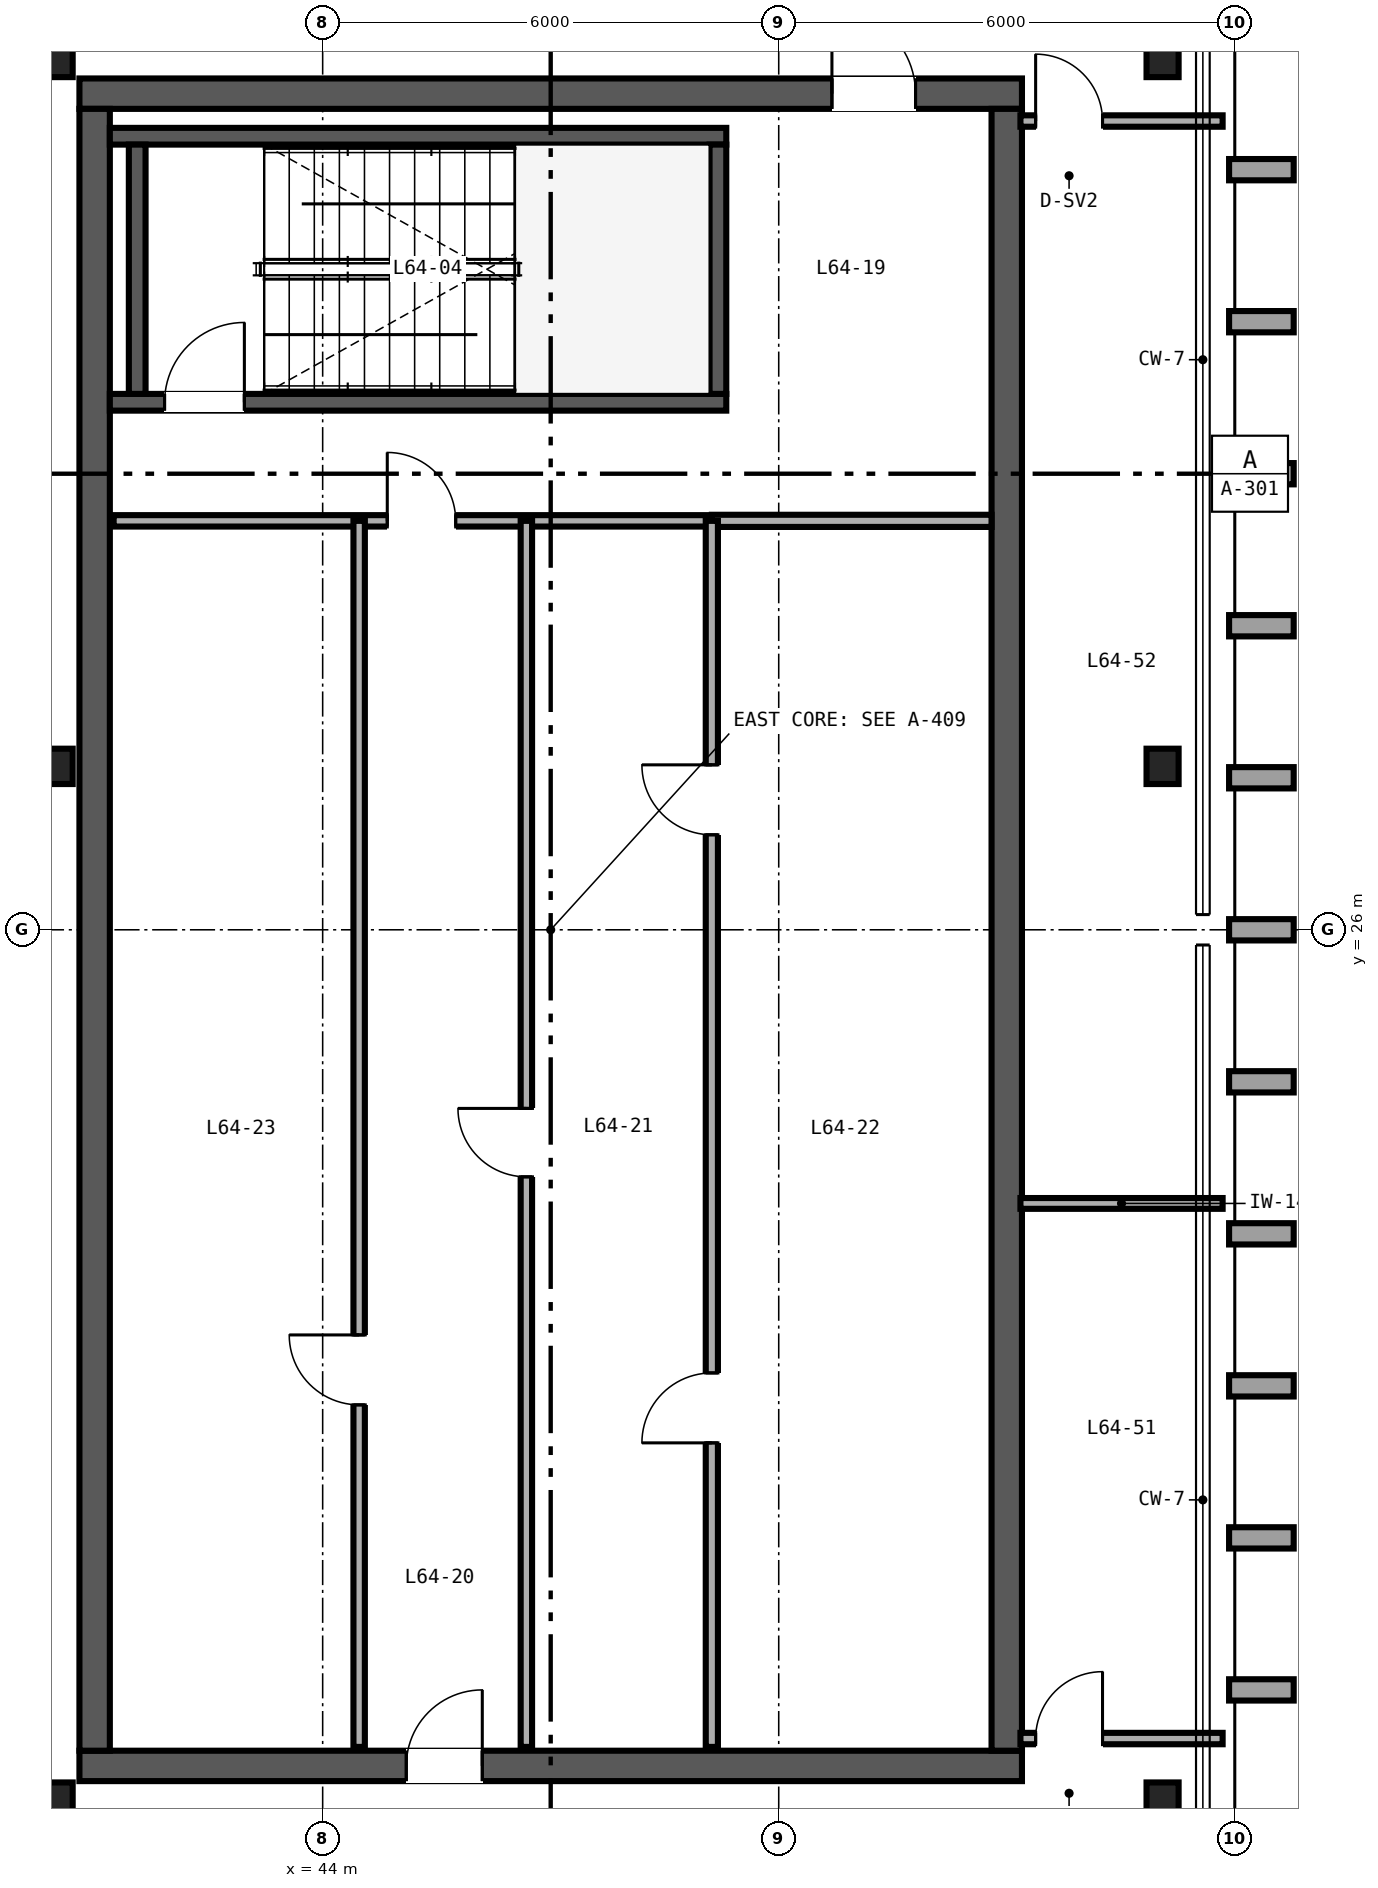
"""IFC4 building model, lengths in metres.
Left out: names, types, materials, properties, quantities, classifications, styles, units other than length and angle.
Written with IfcOpenShell. Run it as: python <this file> out.ifc"""

import sys

from ifc_helpers import new_model, si_unit, direction, frame, frame_2d, origin, origin_2d, place, context, subcontext, project, spatial, rectangle, i_section, extrude, source, transform, mapped, element, fill, save


model = new_model("IFC4")
c1 = context("Model", 3, precision=1e-05, world=origin(), true_north=direction((0.0, 1.0)))
c2 = subcontext(c1, "Body", "Model", "MODEL_VIEW")
j1 = project(units=[si_unit("LENGTHUNIT", "METRE"), si_unit("PLANEANGLEUNIT", "RADIAN")], contexts=[c1])
p1 = place(None, origin())
s1 = spatial("IfcSite", under=j1, at=p1, CompositionType="ELEMENT")
p2 = place(p1, origin())
s2 = spatial("IfcBuilding", under=s1, at=p2, CompositionType="ELEMENT")
p3 = place(p2, frame((0.0, 0.0, 254.4)))
s3 = spatial("IfcBuildingStorey", under=s2, at=p3, CompositionType="ELEMENT", Elevation=254.4)
p4 = place(p3, frame((40.8, 15.0, 0.0), z_axis=(0.0, 0.0, 1.0), x_axis=(1.0, 0.0, 0.0)))
e1 = element("IfcWall", 1, at=p4, inside=s3, PredefinedType="SHEAR", context=c2, shape_type="SweptSolid", body=[
    extrude(rectangle(XDim=12.4, YDim=0.4, at=frame_2d((6.2, 0.0))), origin(), (0.0, 0.0, 1.0), 3.38),
])
p5 = place(p4, frame((4.3, 0.0, 0.0)))
e2 = element("IfcOpeningElement", 2, at=p5, cuts=e1, PredefinedType="OPENING", context=c2, shape_type="SweptSolid", body=[
    extrude(rectangle(XDim=1.0, YDim=2.15, at=frame_2d((0.5, 1.075))), frame((0.0, 0.21, 0.0), z_axis=(0.0, -1.0, 0.0), x_axis=(1.0, 0.0, 0.0)), (0.0, 0.0, 1.0), 0.42),
])
p6 = place(p3, frame((40.8, 37.0, 0.0), z_axis=(0.0, 0.0, 1.0), x_axis=(1.0, 0.0, 0.0)))
e3 = element("IfcWall", 3, at=p6, inside=s3, PredefinedType="SHEAR", context=c2, shape_type="SweptSolid", body=[
    extrude(rectangle(XDim=12.4, YDim=0.4, at=frame_2d((6.2, 0.0))), origin(), (0.0, 0.0, 1.0), 3.38),
])
p7 = place(p6, frame((9.9, 0.0, 0.0)))
e4 = element("IfcOpeningElement", 4, at=p7, cuts=e3, PredefinedType="OPENING", context=c2, shape_type="SweptSolid", body=[
    extrude(rectangle(XDim=1.1, YDim=2.15, at=frame_2d((0.55, 1.075))), frame((0.0, 0.21, 0.0), z_axis=(0.0, -1.0, 0.0), x_axis=(1.0, 0.0, 0.0)), (0.0, 0.0, 1.0), 0.42),
])
for number, where, z_axis, x_axis in (
    (5, (41.0, 15.2, 0.0), (0.0, 0.0, 1.0), (0.0, 1.0, 0.0)),
    (6, (53.0, 15.2, 0.0), (0.0, 0.0, 1.0), (0.0, 1.0, 0.0)),
):
    element("IfcWall", number, at=place(p3, frame(where, z_axis=z_axis, x_axis=x_axis)), inside=s3, PredefinedType="SHEAR", context=c2, shape_type="SweptSolid", body=[
        extrude(rectangle(XDim=21.6, YDim=0.4, at=frame_2d((10.8, 0.0))), origin(), (0.0, 0.0, 1.0), 3.38),
    ])
p8 = place(p3, frame((41.2, 32.94, 0.0), z_axis=(0.0, 0.0, 1.0), x_axis=(1.0, 0.0, 0.0)))
e7 = element("IfcWall", 7, at=p8, inside=s3, PredefinedType="SHEAR", context=c2, shape_type="SweptSolid", body=[
    extrude(rectangle(XDim=8.11, YDim=0.22, at=frame_2d((4.055, 0.0))), origin(), (0.0, 0.0, 1.0), 3.4),
])
p9 = place(p8, frame((0.72, 0.0, 0.0)))
e8 = element("IfcOpeningElement", 8, at=p9, cuts=e7, PredefinedType="OPENING", context=c2, shape_type="SweptSolid", body=[
    extrude(rectangle(XDim=1.05, YDim=2.15, at=frame_2d((0.525, 1.075))), frame((0.0, 0.12, 0.0), z_axis=(0.0, -1.0, 0.0), x_axis=(1.0, 0.0, 0.0)), (0.0, 0.0, 1.0), 0.24),
])
p10 = place(p3, frame((41.2, 36.44, 0.0), z_axis=(0.0, 0.0, 1.0), x_axis=(1.0, 0.0, 0.0)))
e9 = element("IfcWall", 9, at=p10, inside=s3, PredefinedType="SHEAR", context=c2, shape_type="SweptSolid", body=[
    extrude(rectangle(XDim=8.11, YDim=0.22, at=frame_2d((4.055, 0.0))), origin(), (0.0, 0.0, 1.0), 3.4),
])
for number, where, z_axis, x_axis in (
    (10, (41.56, 33.05, 0.0), (0.0, 0.0, 1.0), (0.0, 1.0, 0.0)),
    (11, (49.2, 33.05, 0.0), (0.0, 0.0, 1.0), (0.0, 1.0, 0.0)),
):
    element("IfcWall", number, at=place(p3, frame(where, z_axis=z_axis, x_axis=x_axis)), inside=s3, PredefinedType="SHEAR", context=c2, shape_type="SweptSolid", body=[
        extrude(rectangle(XDim=3.28, YDim=0.22, at=frame_2d((1.64, 0.0))), origin(), (0.0, 0.0, 1.0), 3.4),
    ])
m1 = source(origin(), c2, "Body", "SweptSolid", [
    extrude(i_section(OverallWidth=0.422, OverallDepth=0.465, WebThickness=0.045, FlangeThickness=0.073, FilletRadius=0.025, at=origin_2d()), origin(), (0.0, 0.0, 1.0), 3.38),
])
for number, where, z_axis, x_axis in (
    (12, (40.5, 14.55, 0.0), (0.0, 0.0, 1.0), (1.0, 0.0, 0.0)),
    (13, (55.05, 14.55, 0.0), (0.0, 0.0, 1.0), (1.0, 0.0, 0.0)),
    (14, (40.5, 28.15, 0.0), (0.0, 0.0, 1.0), (1.0, 0.0, 0.0)),
    (15, (55.05, 28.15, 0.0), (0.0, 0.0, 1.0), (1.0, 0.0, 0.0)),
    (16, (40.5, 37.45, 0.0), (0.0, 0.0, 1.0), (1.0, 0.0, 0.0)),
    (17, (55.05, 37.45, 0.0), (0.0, 0.0, 1.0), (1.0, 0.0, 0.0)),
):
    element("IfcColumn", number, at=place(p3, frame(where, z_axis=z_axis, x_axis=x_axis)), inside=s3, PredefinedType="COLUMN", context=c2, shape_type="MappedRepresentation", body=[
        mapped(m1, transform((0.0, 0.0, 0.0), scale=1.0)),
    ])
p11 = place(p3, frame((41.25, 31.38, 0.0), z_axis=(0.0, 0.0, 1.0), x_axis=(1.0, 0.0, 0.0)))
e18 = element("IfcWall", 18, at=p11, inside=s3, PredefinedType="PARTITIONING", context=c2, shape_type="SweptSolid", body=[
    extrude(rectangle(XDim=7.87, YDim=0.15, at=frame_2d((3.935, 0.0))), origin(), (0.0, 0.0, 1.0), 2.48),
])
p12 = place(p11, frame((3.6, 0.0, 0.0)))
e19 = element("IfcOpeningElement", 19, at=p12, cuts=e18, PredefinedType="OPENING", context=c2, shape_type="SweptSolid", body=[
    extrude(rectangle(XDim=0.9, YDim=2.15, at=frame_2d((0.45, 1.075))), frame((0.0, 0.085, 0.0), z_axis=(0.0, -1.0, 0.0), x_axis=(1.0, 0.0, 0.0)), (0.0, 0.0, 1.0), 0.17),
])
p13 = place(p3, frame((46.68, 15.25, 0.0), z_axis=(0.0, 0.0, 1.0), x_axis=(0.0, 1.0, 0.0)))
e20 = element("IfcWall", 20, at=p13, inside=s3, PredefinedType="PARTITIONING", context=c2, shape_type="SweptSolid", body=[
    extrude(rectangle(XDim=16.13, YDim=0.15, at=frame_2d((8.065, 0.0))), origin(), (0.0, 0.0, 1.0), 2.453),
])
p14 = place(p13, frame((7.5, 0.0, 0.0)))
e21 = element("IfcOpeningElement", 21, at=p14, cuts=e20, PredefinedType="OPENING", context=c2, shape_type="SweptSolid", body=[
    extrude(rectangle(XDim=0.9, YDim=2.15, at=frame_2d((0.45, 1.075))), frame((0.0, 0.085, 0.0), z_axis=(0.0, -1.0, 0.0), x_axis=(1.0, 0.0, 0.0)), (0.0, 0.0, 1.0), 0.17),
])
p15 = place(p3, frame((49.12, 31.38, 0.0), z_axis=(0.0, 0.0, 1.0), x_axis=(1.0, 0.0, 0.0)))
e22 = element("IfcWall", 22, at=p15, inside=s3, PredefinedType="PARTITIONING", context=c2, shape_type="SweptSolid", body=[
    extrude(rectangle(XDim=3.68, YDim=0.16, at=frame_2d((1.84, 0.0))), origin(), (0.0, 0.0, 1.0), 2.48),
])
p16 = place(p3, frame((49.12, 15.25, 0.0), z_axis=(0.0, 0.0, 1.0), x_axis=(0.0, 1.0, 0.0)))
e23 = element("IfcWall", 23, at=p16, inside=s3, PredefinedType="PARTITIONING", context=c2, shape_type="SweptSolid", body=[
    extrude(rectangle(XDim=16.13, YDim=0.16, at=frame_2d((8.065, 0.0))), origin(), (0.0, 0.0, 1.0), 2.453),
])
p17 = place(p16, frame((4.0, 0.0, 0.0)))
e24 = element("IfcOpeningElement", 24, at=p17, cuts=e23, PredefinedType="OPENING", context=c2, shape_type="SweptSolid", body=[
    extrude(rectangle(XDim=0.92, YDim=2.15, at=frame_2d((0.46, 1.075))), frame((0.0, 0.09, 0.0), z_axis=(0.0, -1.0, 0.0), x_axis=(1.0, 0.0, 0.0)), (0.0, 0.0, 1.0), 0.18),
])
p18 = place(p16, frame((12.0, 0.0, 0.0)))
e25 = element("IfcOpeningElement", 25, at=p18, cuts=e23, PredefinedType="OPENING", context=c2, shape_type="SweptSolid", body=[
    extrude(rectangle(XDim=0.92, YDim=2.15, at=frame_2d((0.46, 1.075))), frame((0.0, 0.09, 0.0), z_axis=(0.0, -1.0, 0.0), x_axis=(1.0, 0.0, 0.0)), (0.0, 0.0, 1.0), 0.18),
])
p19 = place(p3, frame((44.48, 15.25, 0.0), z_axis=(0.0, 0.0, 1.0), x_axis=(0.0, 1.0, 0.0)))
e26 = element("IfcWall", 26, at=p19, inside=s3, PredefinedType="PARTITIONING", context=c2, shape_type="SweptSolid", body=[
    extrude(rectangle(XDim=16.13, YDim=0.15, at=frame_2d((8.065, 0.0))), origin(), (0.0, 0.0, 1.0), 2.453),
])
p20 = place(p19, frame((4.5, 0.0, 0.0)))
e27 = element("IfcOpeningElement", 27, at=p20, cuts=e26, PredefinedType="OPENING", context=c2, shape_type="SweptSolid", body=[
    extrude(rectangle(XDim=0.92, YDim=2.15, at=frame_2d((0.46, 1.075))), frame((0.0, 0.085, 0.0), z_axis=(0.0, -1.0, 0.0), x_axis=(1.0, 0.0, 0.0)), (0.0, 0.0, 1.0), 0.17),
])
p21 = place(p3, frame((53.18, 15.36, 0.0), z_axis=(0.0, 0.0, 1.0), x_axis=(1.0, 0.0, 0.0)))
e28 = element("IfcWall", 28, at=p21, inside=s3, PredefinedType="PARTITIONING", context=c2, shape_type="SweptSolid", body=[
    extrude(rectangle(XDim=2.66, YDim=0.15, at=frame_2d((1.33, 0.0))), origin(), (0.0, 0.0, 1.0), 2.601),
])
p22 = place(p21, frame((0.2, 0.0, 0.0)))
e29 = element("IfcOpeningElement", 29, at=p22, cuts=e28, PredefinedType="OPENING", context=c2, shape_type="SweptSolid", body=[
    extrude(rectangle(XDim=0.88, YDim=2.15, at=frame_2d((0.44, 1.075))), frame((0.0, 0.085, 0.0), z_axis=(0.0, -1.0, 0.0), x_axis=(1.0, 0.0, 0.0)), (0.0, 0.0, 1.0), 0.17),
])
p23 = place(p3, frame((53.18, 36.64, 0.0), z_axis=(0.0, 0.0, 1.0), x_axis=(1.0, 0.0, 0.0)))
e30 = element("IfcWall", 30, at=p23, inside=s3, PredefinedType="PARTITIONING", context=c2, shape_type="SweptSolid", body=[
    extrude(rectangle(XDim=2.66, YDim=0.15, at=frame_2d((1.33, 0.0))), origin(), (0.0, 0.0, 1.0), 2.763),
])
p24 = place(p23, frame((0.2, 0.0, 0.0)))
e31 = element("IfcOpeningElement", 31, at=p24, cuts=e30, PredefinedType="OPENING", context=c2, shape_type="SweptSolid", body=[
    extrude(rectangle(XDim=0.88, YDim=2.15, at=frame_2d((0.44, 1.075))), frame((0.0, 0.085, 0.0), z_axis=(0.0, -1.0, 0.0), x_axis=(1.0, 0.0, 0.0)), (0.0, 0.0, 1.0), 0.17),
])
p25 = place(p3, frame((53.18, 22.4, 0.0), z_axis=(0.0, 0.0, 1.0), x_axis=(1.0, 0.0, 0.0)))
e32 = element("IfcWall", 32, at=p25, inside=s3, PredefinedType="PARTITIONING", context=c2, shape_type="SweptSolid", body=[
    extrude(rectangle(XDim=2.66, YDim=0.142, at=frame_2d((1.33, 0.0))), origin(), (0.0, 0.0, 1.0), 2.601),
])
m2 = source(origin(), c2, "Body", "SweptSolid", [
    extrude(rectangle(XDim=1.05, YDim=2.15, at=frame_2d((0.525, 1.075))), frame((0.0, 0.025, 0.0), z_axis=(0.0, -1.0, 0.0), x_axis=(1.0, 0.0, 0.0)), (0.0, 0.0, 1.0), 0.05),
])
p26 = place(p9, origin())
e33 = element("IfcDoor", 33, at=p26, inside=s3, OperationType="SINGLE_SWING_RIGHT", PredefinedType="DOOR", context=c2, shape_type="MappedRepresentation", body=[
    mapped(m2, transform((0.0, 0.0, 0.0), scale=1.0)),
])
fill(e8, e33)
m3 = source(origin(), c2, "Body", "SweptSolid", [
    extrude(rectangle(XDim=0.9, YDim=2.15, at=frame_2d((0.45, 1.075))), frame((0.0, 0.025, 0.0), z_axis=(0.0, -1.0, 0.0), x_axis=(1.0, 0.0, 0.0)), (0.0, 0.0, 1.0), 0.05),
])
p27 = place(p14, origin())
e34 = element("IfcDoor", 34, at=p27, inside=s3, OperationType="SINGLE_SWING_RIGHT", PredefinedType="DOOR", context=c2, shape_type="MappedRepresentation", body=[
    mapped(m3, transform((0.0, 0.0, 0.0), scale=1.0)),
])
fill(e21, e34)
p28 = place(p12, origin())
e35 = element("IfcDoor", 35, at=p28, inside=s3, OperationType="SINGLE_SWING_LEFT", PredefinedType="DOOR", context=c2, shape_type="MappedRepresentation", body=[
    mapped(m3, transform((0.0, 0.0, 0.0), scale=1.0)),
])
fill(e19, e35)
m4 = source(origin(), c2, "Body", "SweptSolid", [
    extrude(rectangle(XDim=1.0, YDim=2.15, at=frame_2d((0.5, 1.075))), frame((0.0, 0.025, 0.0), z_axis=(0.0, -1.0, 0.0), x_axis=(1.0, 0.0, 0.0)), (0.0, 0.0, 1.0), 0.05),
])
p29 = place(p5, origin())
e36 = element("IfcDoor", 36, at=p29, inside=s3, OperationType="SINGLE_SWING_RIGHT", PredefinedType="DOOR", context=c2, shape_type="MappedRepresentation", body=[
    mapped(m4, transform((0.0, 0.0, 0.0), scale=1.0)),
])
fill(e2, e36)
m5 = source(origin(), c2, "Body", "SweptSolid", [
    extrude(rectangle(XDim=1.1, YDim=2.15, at=frame_2d((0.55, 1.075))), frame((0.0, 0.025, 0.0), z_axis=(0.0, -1.0, 0.0), x_axis=(1.0, 0.0, 0.0)), (0.0, 0.0, 1.0), 0.05),
])
p30 = place(p7, origin())
e37 = element("IfcDoor", 37, at=p30, inside=s3, OperationType="SINGLE_SWING_LEFT", PredefinedType="DOOR", context=c2, shape_type="MappedRepresentation", body=[
    mapped(m5, transform((0.0, 0.0, 0.0), scale=1.0)),
])
fill(e4, e37)
m6 = source(origin(), c2, "Body", "SweptSolid", [
    extrude(rectangle(XDim=0.92, YDim=2.15, at=frame_2d((0.46, 1.075))), frame((0.0, 0.025, 0.0), z_axis=(0.0, -1.0, 0.0), x_axis=(1.0, 0.0, 0.0)), (0.0, 0.0, 1.0), 0.05),
])
p31 = place(p17, origin())
e38 = element("IfcDoor", 38, at=p31, inside=s3, OperationType="SINGLE_SWING_LEFT", PredefinedType="DOOR", context=c2, shape_type="MappedRepresentation", body=[
    mapped(m6, transform((0.0, 0.0, 0.0), scale=1.0)),
])
fill(e24, e38)
p32 = place(p18, origin())
e39 = element("IfcDoor", 39, at=p32, inside=s3, OperationType="SINGLE_SWING_RIGHT", PredefinedType="DOOR", context=c2, shape_type="MappedRepresentation", body=[
    mapped(m6, transform((0.0, 0.0, 0.0), scale=1.0)),
])
fill(e25, e39)
p33 = place(p20, origin())
e40 = element("IfcDoor", 40, at=p33, inside=s3, OperationType="SINGLE_SWING_RIGHT", PredefinedType="DOOR", context=c2, shape_type="MappedRepresentation", body=[
    mapped(m6, transform((0.0, 0.0, 0.0), scale=1.0)),
])
fill(e27, e40)
m7 = source(origin(), c2, "Body", "SweptSolid", [
    extrude(rectangle(XDim=0.88, YDim=2.15, at=frame_2d((0.44, 1.075))), frame((0.0, 0.025, 0.0), z_axis=(0.0, -1.0, 0.0), x_axis=(1.0, 0.0, 0.0)), (0.0, 0.0, 1.0), 0.05),
])
p34 = place(p22, origin())
e41 = element("IfcDoor", 41, at=p34, inside=s3, OperationType="SINGLE_SWING_RIGHT", PredefinedType="DOOR", context=c2, shape_type="MappedRepresentation", body=[
    mapped(m7, transform((0.0, 0.0, 0.0), scale=1.0)),
])
fill(e29, e41)
p35 = place(p24, origin())
e42 = element("IfcDoor", 42, at=p35, inside=s3, OperationType="SINGLE_SWING_LEFT", PredefinedType="DOOR", context=c2, shape_type="MappedRepresentation", body=[
    mapped(m7, transform((0.0, 0.0, 0.0), scale=1.0)),
])
fill(e31, e42)
save(model, sys.argv[1])
